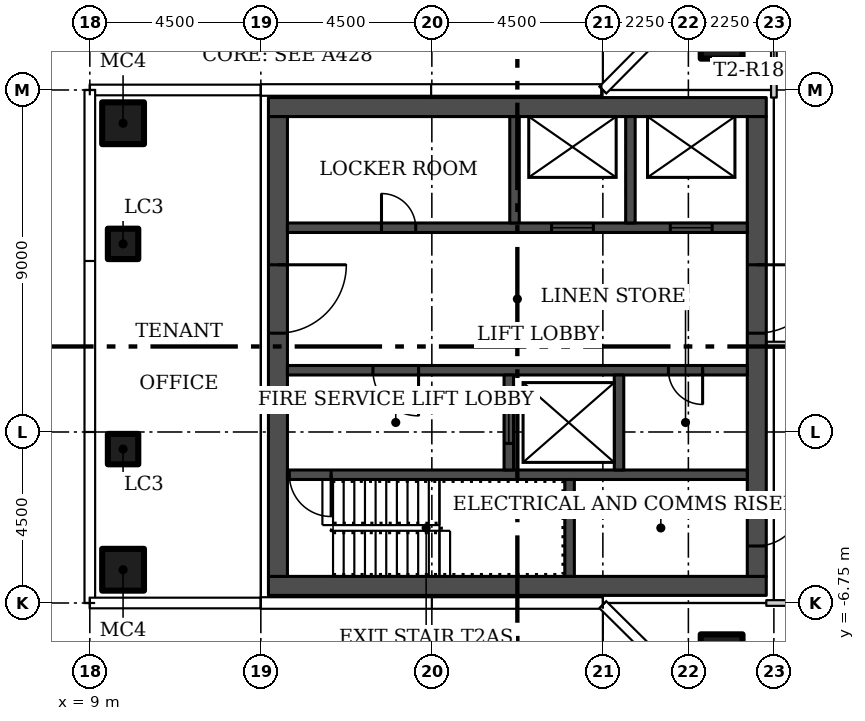
"""IFC4 building model, lengths in metres.
Left out: names, types, materials, properties, quantities, classifications, styles, units other than length and angle.
Written with IfcOpenShell. Run it as: python <this file> out.ifc"""

import sys

from ifc_helpers import new_model, si_unit, direction, frame, frame_2d, origin, origin_2d, place, context, subcontext, project, spatial, rectangle, hollow_rectangle, extrude, element, fill, save


model = new_model("IFC4")
c1 = context("Model", 3, precision=1e-05, world=origin(), true_north=direction((0.0, 1.0)))
c2 = subcontext(c1, "Body", "Model", "MODEL_VIEW")
j1 = project(units=[si_unit("LENGTHUNIT", "METRE"), si_unit("PLANEANGLEUNIT", "RADIAN")], contexts=[c1])
p1 = place(None, origin())
s1 = spatial("IfcSite", under=j1, at=p1, CompositionType="ELEMENT")
p2 = place(p1, origin())
s2 = spatial("IfcBuilding", under=s1, at=p2, CompositionType="ELEMENT")
p3 = place(p2, frame((0.0, 0.0, 162.3)))
s3 = spatial("IfcBuildingStorey", under=s2, at=p3, CompositionType="ELEMENT", Elevation=162.3)
for number, where in (
    (1, (25.625, 8.125, 0.0)),
    (2, (25.625, -8.125, 0.0)),
    (3, (9.875, -5.875, 0.0)),
    (4, (9.875, 5.875, 0.0)),
):
    element("IfcColumn", number, at=place(p3, frame(where)), inside=s3, PredefinedType="COLUMN", context=c2, shape_type="SweptSolid", body=[
        extrude(hollow_rectangle(XDim=1.1, YDim=1.1, WallThickness=0.04, at=origin_2d()), origin(), (0.0, 0.0, 1.0), 3.55),
    ])
for number, where in (
    (5, (9.875, -2.7, 0.0)),
    (6, (9.875, 2.7, 0.0)),
):
    element("IfcColumn", number, at=place(p3, frame(where)), inside=s3, PredefinedType="COLUMN", context=c2, shape_type="SweptSolid", body=[
        extrude(hollow_rectangle(XDim=0.8, YDim=0.8, WallThickness=0.03, at=origin_2d()), origin(), (0.0, 0.0, 1.0), 3.55),
    ])
p4 = place(p3, frame((37.575, 0.05, 0.0), z_axis=(0.0, 0.0, 1.0), x_axis=(-1.0, 0.0, 0.0)))
e7 = element("IfcWall", 7, at=p4, inside=s3, PredefinedType="PARTITIONING", context=c2, shape_type="SweptSolid", body=[
    extrude(rectangle(XDim=10.775, YDim=0.15, at=frame_2d((5.387, 0.0))), origin(), (0.0, 0.0, 1.0), 3.55),
])
p5 = place(p4, frame((7.5, 0.0, 0.0)))
e8 = element("IfcOpeningElement", 8, at=p5, cuts=e7, PredefinedType="OPENING", context=c2, shape_type="SweptSolid", body=[
    extrude(rectangle(XDim=0.9, YDim=2.1, at=frame_2d((0.45, 1.05))), frame((0.0, 0.085, 0.0), z_axis=(0.0, -1.0, 0.0), x_axis=(1.0, 0.0, 0.0)), (0.0, 0.0, 1.0), 0.17),
])
p6 = place(p3, frame((27.0, 6.55, 0.0), z_axis=(0.0, 0.0, 1.0), x_axis=(0.0, 1.0, 0.0)))
e9 = element("IfcWall", 9, at=p6, inside=s3, PredefinedType="PARTITIONING", context=c2, shape_type="SweptSolid", body=[
    extrude(rectangle(XDim=4.605, YDim=0.15, at=frame_2d((2.302, 0.0))), origin(), (0.0, 0.0, 1.0), 3.55),
])
p7 = place(p6, frame((2.15, 0.0, 0.0)))
e10 = element("IfcOpeningElement", 10, at=p7, cuts=e9, PredefinedType="OPENING", context=c2, shape_type="SweptSolid", body=[
    extrude(rectangle(XDim=0.9, YDim=2.1, at=frame_2d((0.45, 1.05))), frame((0.0, 0.085, 0.0), z_axis=(0.0, -1.0, 0.0), x_axis=(1.0, 0.0, 0.0)), (0.0, 0.0, 1.0), 0.17),
])
p8 = place(p3, frame((37.425, -6.75, 0.0), z_axis=(0.0, 0.0, 1.0), x_axis=(-1.0, 0.0, 0.0)))
e11 = element("IfcWall", 11, at=p8, inside=s3, PredefinedType="PARTITIONING", context=c2, shape_type="SweptSolid", body=[
    extrude(rectangle(XDim=10.625, YDim=0.15, at=frame_2d((5.312, 0.0))), origin(), (0.0, 0.0, 1.0), 3.55),
])
for number, where in (
    (12, (13.7, -6.3, 0.0)),
    (13, (13.7, 6.3, 0.0)),
):
    element("IfcWall", number, at=place(p3, frame(where)), inside=s3, PredefinedType="SHEAR", context=c2, shape_type="SweptSolid", body=[
        extrude(rectangle(XDim=13.1, YDim=0.5, at=frame_2d((6.55, 0.0))), origin(), (0.0, 0.0, 1.0), 3.55),
    ])
p9 = place(p3, frame((13.95, 6.05, 0.0), z_axis=(0.0, 0.0, 1.0), x_axis=(0.0, -1.0, 0.0)))
e14 = element("IfcWall", 14, at=p9, inside=s3, PredefinedType="SHEAR", context=c2, shape_type="SweptSolid", body=[
    extrude(rectangle(XDim=12.1, YDim=0.5, at=frame_2d((6.05, 0.0))), origin(), (0.0, 0.0, 1.0), 3.55),
])
p10 = place(p9, frame((3.9, 0.0, 0.0)))
e15 = element("IfcOpeningElement", 15, at=p10, cuts=e14, PredefinedType="OPENING", context=c2, shape_type="SweptSolid", body=[
    extrude(rectangle(XDim=1.8, YDim=2.4, at=frame_2d((0.9, 1.2))), frame((0.0, 0.26, 0.0), z_axis=(0.0, -1.0, 0.0), x_axis=(1.0, 0.0, 0.0)), (0.0, 0.0, 1.0), 0.52),
])
p11 = place(p3, frame((26.55, 6.05, 0.0), z_axis=(0.0, 0.0, 1.0), x_axis=(0.0, -1.0, 0.0)))
e16 = element("IfcWall", 16, at=p11, inside=s3, PredefinedType="SHEAR", context=c2, shape_type="SweptSolid", body=[
    extrude(rectangle(XDim=12.1, YDim=0.5, at=frame_2d((6.05, 0.0))), origin(), (0.0, 0.0, 1.0), 3.55),
])
p12 = place(p11, frame((10.1, 0.0, 0.0)))
e17 = element("IfcOpeningElement", 17, at=p12, cuts=e16, PredefinedType="OPENING", context=c2, shape_type="SweptSolid", body=[
    extrude(rectangle(XDim=1.2, YDim=2.1, at=frame_2d((0.6, 1.05))), frame((0.0, 0.26, 0.0), z_axis=(0.0, -1.0, 0.0), x_axis=(1.0, 0.0, 0.0)), (0.0, 0.0, 1.0), 0.52),
])
p13 = place(p11, frame((3.9, 0.0, 0.0)))
e18 = element("IfcOpeningElement", 18, at=p13, cuts=e16, PredefinedType="OPENING", context=c2, shape_type="SweptSolid", body=[
    extrude(rectangle(XDim=1.8, YDim=2.4, at=frame_2d((0.9, 1.2))), frame((0.0, 0.26, 0.0), z_axis=(0.0, -1.0, 0.0), x_axis=(1.0, 0.0, 0.0)), (0.0, 0.0, 1.0), 0.52),
])
p14 = place(p3, frame((26.3, -3.375, 0.0), z_axis=(0.0, 0.0, 1.0), x_axis=(-1.0, 0.0, 0.0)))
e19 = element("IfcWall", 19, at=p14, inside=s3, PredefinedType="SHEAR", context=c2, shape_type="SweptSolid", body=[
    extrude(rectangle(XDim=12.1, YDim=0.25, at=frame_2d((6.05, 0.0))), origin(), (0.0, 0.0, 1.0), 3.55),
])
p15 = place(p14, frame((10.95, 0.0, 0.0)))
e20 = element("IfcOpeningElement", 20, at=p15, cuts=e19, PredefinedType="OPENING", context=c2, shape_type="SweptSolid", body=[
    extrude(rectangle(XDim=1.1, YDim=2.1, at=frame_2d((0.55, 1.05))), frame((0.0, 0.135, 0.0), z_axis=(0.0, -1.0, 0.0), x_axis=(1.0, 0.0, 0.0)), (0.0, 0.0, 1.0), 0.27),
])
p16 = place(p3, frame((21.625, -6.05, 0.0), z_axis=(0.0, 0.0, 1.0), x_axis=(0.0, 1.0, 0.0)))
e21 = element("IfcWall", 21, at=p16, inside=s3, PredefinedType="SHEAR", context=c2, shape_type="SweptSolid", body=[
    extrude(rectangle(XDim=2.55, YDim=0.25, at=frame_2d((1.275, 0.0))), origin(), (0.0, 0.0, 1.0), 3.55),
])
p17 = place(p3, frame((26.3, -0.625, 0.0), z_axis=(0.0, 0.0, 1.0), x_axis=(-1.0, 0.0, 0.0)))
e22 = element("IfcWall", 22, at=p17, inside=s3, PredefinedType="SHEAR", context=c2, shape_type="SweptSolid", body=[
    extrude(rectangle(XDim=12.1, YDim=0.25, at=frame_2d((6.05, 0.0))), origin(), (0.0, 0.0, 1.0), 3.55),
])
p18 = place(p17, frame((8.65, 0.0, 0.0)))
e23 = element("IfcOpeningElement", 23, at=p18, cuts=e22, PredefinedType="OPENING", context=c2, shape_type="SweptSolid", body=[
    extrude(rectangle(XDim=1.2, YDim=2.1, at=frame_2d((0.6, 1.05))), frame((0.0, 0.135, 0.0), z_axis=(0.0, -1.0, 0.0), x_axis=(1.0, 0.0, 0.0)), (0.0, 0.0, 1.0), 0.27),
])
p19 = place(p17, frame((1.175, 0.0, 0.0)))
e24 = element("IfcOpeningElement", 24, at=p19, cuts=e22, PredefinedType="OPENING", context=c2, shape_type="SweptSolid", body=[
    extrude(rectangle(XDim=0.9, YDim=2.1, at=frame_2d((0.45, 1.05))), frame((0.0, 0.135, 0.0), z_axis=(0.0, -1.0, 0.0), x_axis=(1.0, 0.0, 0.0)), (0.0, 0.0, 1.0), 0.27),
])
p20 = place(p3, frame((20.025, -3.25, 0.0), z_axis=(0.0, 0.0, 1.0), x_axis=(0.0, 1.0, 0.0)))
e25 = element("IfcWall", 25, at=p20, inside=s3, PredefinedType="SHEAR", context=c2, shape_type="SweptSolid", body=[
    extrude(rectangle(XDim=2.5, YDim=0.25, at=frame_2d((1.25, 0.0))), origin(), (0.0, 0.0, 1.0), 3.55),
])
p21 = place(p20, frame((0.7, 0.0, 0.0)))
e26 = element("IfcOpeningElement", 26, at=p21, cuts=e25, PredefinedType="OPENING", context=c2, shape_type="SweptSolid", body=[
    extrude(rectangle(XDim=1.1, YDim=2.1, at=frame_2d((0.55, 1.05))), frame((0.0, 0.135, 0.0), z_axis=(0.0, -1.0, 0.0), x_axis=(1.0, 0.0, 0.0)), (0.0, 0.0, 1.0), 0.27),
])
p22 = place(p3, frame((22.925, -3.25, 0.0), z_axis=(0.0, 0.0, 1.0), x_axis=(0.0, 1.0, 0.0)))
e27 = element("IfcWall", 27, at=p22, inside=s3, PredefinedType="SHEAR", context=c2, shape_type="SweptSolid", body=[
    extrude(rectangle(XDim=2.5, YDim=0.25, at=frame_2d((1.25, 0.0))), origin(), (0.0, 0.0, 1.0), 3.55),
])
p23 = place(p3, frame((14.2, 3.125, 0.0)))
e28 = element("IfcWall", 28, at=p23, inside=s3, PredefinedType="SHEAR", context=c2, shape_type="SweptSolid", body=[
    extrude(rectangle(XDim=12.1, YDim=0.25, at=frame_2d((6.05, 0.0))), origin(), (0.0, 0.0, 1.0), 3.55),
])
p24 = place(p23, frame((6.95, 0.0, 0.0)))
e29 = element("IfcOpeningElement", 29, at=p24, cuts=e28, PredefinedType="OPENING", context=c2, shape_type="SweptSolid", body=[
    extrude(rectangle(XDim=1.1, YDim=2.1, at=frame_2d((0.55, 1.05))), frame((0.0, 0.135, 0.0), z_axis=(0.0, -1.0, 0.0), x_axis=(1.0, 0.0, 0.0)), (0.0, 0.0, 1.0), 0.27),
])
p25 = place(p23, frame((10.075, 0.0, 0.0)))
e30 = element("IfcOpeningElement", 30, at=p25, cuts=e28, PredefinedType="OPENING", context=c2, shape_type="SweptSolid", body=[
    extrude(rectangle(XDim=1.1, YDim=2.1, at=frame_2d((0.55, 1.05))), frame((0.0, 0.135, 0.0), z_axis=(0.0, -1.0, 0.0), x_axis=(1.0, 0.0, 0.0)), (0.0, 0.0, 1.0), 0.27),
])
p26 = place(p23, frame((2.475, 0.0, 0.0)))
e31 = element("IfcOpeningElement", 31, at=p26, cuts=e28, PredefinedType="OPENING", context=c2, shape_type="SweptSolid", body=[
    extrude(rectangle(XDim=0.9, YDim=2.1, at=frame_2d((0.45, 1.05))), frame((0.0, 0.135, 0.0), z_axis=(0.0, -1.0, 0.0), x_axis=(1.0, 0.0, 0.0)), (0.0, 0.0, 1.0), 0.27),
])
for number, where, z_axis, x_axis in (
    (32, (20.175, 3.25, 0.0), (0.0, 0.0, 1.0), (0.0, 1.0, 0.0)),
    (33, (23.225, 3.25, 0.0), (0.0, 0.0, 1.0), (0.0, 1.0, 0.0)),
):
    element("IfcWall", number, at=place(p3, frame(where, z_axis=z_axis, x_axis=x_axis)), inside=s3, PredefinedType="SHEAR", context=c2, shape_type="SweptSolid", body=[
        extrude(rectangle(XDim=2.8, YDim=0.25, at=frame_2d((1.4, 0.0))), origin(), (0.0, 0.0, 1.0), 3.55),
    ])
p27 = place(p10, origin())
e34 = element("IfcDoor", 34, at=p27, inside=s3, OperationType="DOUBLE_DOOR_SINGLE_SWING", PredefinedType="DOOR", context=c2, shape_type="SweptSolid", body=[
    extrude(rectangle(XDim=1.8, YDim=2.4, at=frame_2d((0.9, 1.2))), frame((0.0, 0.025, 0.0), z_axis=(0.0, -1.0, 0.0), x_axis=(1.0, 0.0, 0.0)), (0.0, 0.0, 1.0), 0.05),
])
fill(e15, e34)
p28 = place(p12, origin())
e35 = element("IfcDoor", 35, at=p28, inside=s3, OperationType="SINGLE_SWING_RIGHT", PredefinedType="DOOR", context=c2, shape_type="SweptSolid", body=[
    extrude(rectangle(XDim=1.2, YDim=2.1, at=frame_2d((0.6, 1.05))), frame((0.0, 0.025, 0.0), z_axis=(0.0, -1.0, 0.0), x_axis=(1.0, 0.0, 0.0)), (0.0, 0.0, 1.0), 0.05),
])
fill(e17, e35)
p29 = place(p13, origin())
e36 = element("IfcDoor", 36, at=p29, inside=s3, OperationType="DOUBLE_DOOR_SINGLE_SWING", PredefinedType="DOOR", context=c2, shape_type="SweptSolid", body=[
    extrude(rectangle(XDim=1.8, YDim=2.4, at=frame_2d((0.9, 1.2))), frame((0.0, 0.025, 0.0), z_axis=(0.0, -1.0, 0.0), x_axis=(1.0, 0.0, 0.0)), (0.0, 0.0, 1.0), 0.05),
])
fill(e18, e36)
p30 = place(p15, origin())
e37 = element("IfcDoor", 37, at=p30, inside=s3, OperationType="SINGLE_SWING_RIGHT", PredefinedType="DOOR", context=c2, shape_type="SweptSolid", body=[
    extrude(rectangle(XDim=1.1, YDim=2.1, at=frame_2d((0.55, 1.05))), frame((0.0, 0.025, 0.0), z_axis=(0.0, -1.0, 0.0), x_axis=(1.0, 0.0, 0.0)), (0.0, 0.0, 1.0), 0.05),
])
fill(e20, e37)
p31 = place(p18, origin())
e38 = element("IfcDoor", 38, at=p31, inside=s3, OperationType="SINGLE_SWING_RIGHT", PredefinedType="DOOR", context=c2, shape_type="SweptSolid", body=[
    extrude(rectangle(XDim=1.2, YDim=2.1, at=frame_2d((0.6, 1.05))), frame((0.0, 0.025, 0.0), z_axis=(0.0, -1.0, 0.0), x_axis=(1.0, 0.0, 0.0)), (0.0, 0.0, 1.0), 0.05),
])
fill(e23, e38)
p32 = place(p19, origin())
e39 = element("IfcDoor", 39, at=p32, inside=s3, OperationType="SINGLE_SWING_LEFT", PredefinedType="DOOR", context=c2, shape_type="SweptSolid", body=[
    extrude(rectangle(XDim=0.9, YDim=2.1, at=frame_2d((0.45, 1.05))), frame((0.0, 0.025, 0.0), z_axis=(0.0, -1.0, 0.0), x_axis=(1.0, 0.0, 0.0)), (0.0, 0.0, 1.0), 0.05),
])
fill(e24, e39)
p33 = place(p21, origin())
e40 = element("IfcDoor", 40, at=p33, inside=s3, OperationType="SLIDING_TO_LEFT", PredefinedType="DOOR", context=c2, shape_type="SweptSolid", body=[
    extrude(rectangle(XDim=1.1, YDim=2.1, at=frame_2d((0.55, 1.05))), frame((0.0, 0.025, 0.0), z_axis=(0.0, -1.0, 0.0), x_axis=(1.0, 0.0, 0.0)), (0.0, 0.0, 1.0), 0.05),
])
fill(e26, e40)
p34 = place(p24, origin())
e41 = element("IfcDoor", 41, at=p34, inside=s3, OperationType="SLIDING_TO_LEFT", PredefinedType="DOOR", context=c2, shape_type="SweptSolid", body=[
    extrude(rectangle(XDim=1.1, YDim=2.1, at=frame_2d((0.55, 1.05))), frame((0.0, 0.025, 0.0), z_axis=(0.0, -1.0, 0.0), x_axis=(1.0, 0.0, 0.0)), (0.0, 0.0, 1.0), 0.05),
])
fill(e29, e41)
p35 = place(p25, origin())
e42 = element("IfcDoor", 42, at=p35, inside=s3, OperationType="SLIDING_TO_LEFT", PredefinedType="DOOR", context=c2, shape_type="SweptSolid", body=[
    extrude(rectangle(XDim=1.1, YDim=2.1, at=frame_2d((0.55, 1.05))), frame((0.0, 0.025, 0.0), z_axis=(0.0, -1.0, 0.0), x_axis=(1.0, 0.0, 0.0)), (0.0, 0.0, 1.0), 0.05),
])
fill(e30, e42)
p36 = place(p26, origin())
e43 = element("IfcDoor", 43, at=p36, inside=s3, OperationType="SINGLE_SWING_LEFT", PredefinedType="DOOR", context=c2, shape_type="SweptSolid", body=[
    extrude(rectangle(XDim=0.9, YDim=2.1, at=frame_2d((0.45, 1.05))), frame((0.0, 0.025, 0.0), z_axis=(0.0, -1.0, 0.0), x_axis=(1.0, 0.0, 0.0)), (0.0, 0.0, 1.0), 0.05),
])
fill(e31, e43)
save(model, sys.argv[1])
